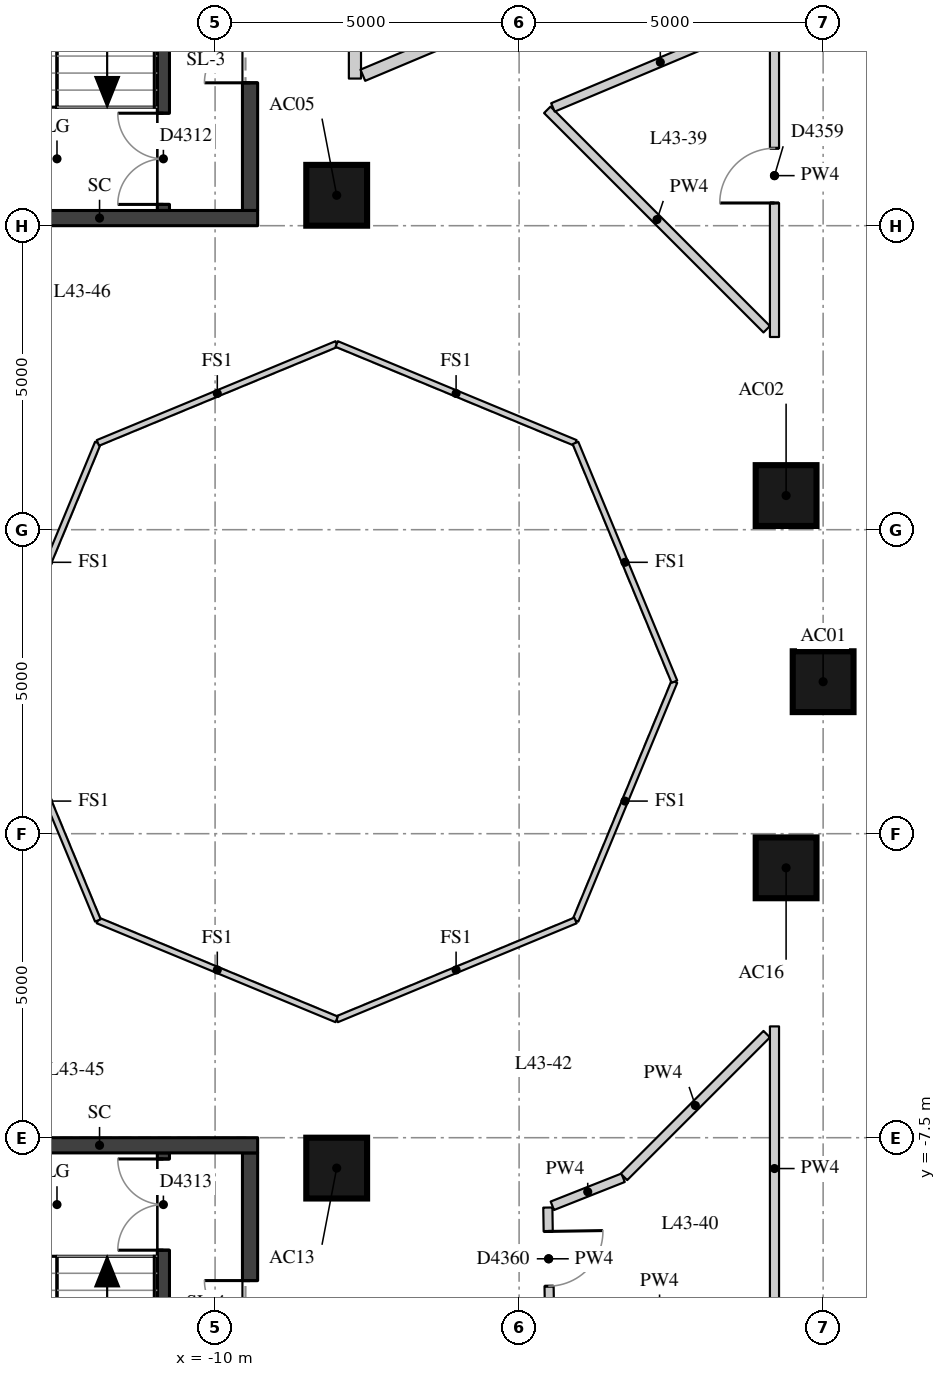
"""IFC4 building model, lengths in metres.
Left out: names, types, materials, properties, quantities, classifications, styles, units other than length and angle.
Written with IfcOpenShell. Run it as: python <this file> out.ifc"""

import sys

from ifc_helpers import new_model, si_unit, direction, frame, frame_2d, origin, origin_2d, place, context, subcontext, project, spatial, rectangle, extrude, element, fill, save


model = new_model("IFC4")
c1 = context("Model", 3, precision=1e-05, world=origin(), true_north=direction((0.0, 1.0)))
c2 = subcontext(c1, "Body", "Model", "MODEL_VIEW")
j1 = project(units=[si_unit("LENGTHUNIT", "METRE"), si_unit("PLANEANGLEUNIT", "RADIAN")], contexts=[c1])
p1 = place(None, origin())
s1 = spatial("IfcSite", under=j1, at=p1, CompositionType="ELEMENT")
p2 = place(p1, origin())
s2 = spatial("IfcBuilding", under=s1, at=p2, CompositionType="ELEMENT")
p3 = place(p2, frame((0.0, 0.0, 155.0)))
s3 = spatial("IfcBuildingStorey", under=s2, at=p3, CompositionType="ELEMENT", Elevation=155.0)
for number, where, z_axis, x_axis in (
    (1, (0.0, 0.0, 0.0), (0.0, 0.0, 1.0), (1.0, 0.0, 0.0)),
    (2, (-0.609, 3.062, 0.0), (0.0, 0.0, 1.0), (1.0, 0.0, 0.0)),
    (3, (-8.0, 8.0, 0.0), (0.0, 0.0, 1.0), (1.0, 0.0, 0.0)),
    (4, (-8.0, -8.0, 0.0), (0.0, 0.0, 1.0), (1.0, 0.0, 0.0)),
    (5, (-0.609, -3.062, 0.0), (0.0, 0.0, 1.0), (1.0, 0.0, 0.0)),
):
    element("IfcColumn", number, at=place(p3, frame(where, z_axis=z_axis, x_axis=x_axis)), inside=s3, PredefinedType="COLUMN", context=c2, shape_type="SweptSolid", body=[
        extrude(rectangle(XDim=1.0, YDim=1.0, at=origin_2d()), origin(), (0.0, 0.0, 1.0), 3.3),
    ])
p4 = place(p3, frame((-10.85, 7.75, 0.0), z_axis=(0.0, 0.0, 1.0), x_axis=(0.0, 1.0, 0.0)))
e6 = element("IfcWall", 6, at=p4, inside=s3, PredefinedType="SHEAR", context=c2, shape_type="SweptSolid", body=[
    extrude(rectangle(XDim=6.0, YDim=0.2, at=frame_2d((3.0, 0.0))), origin(), (0.0, 0.0, 1.0), 3.02),
])
p5 = place(p4, frame((0.1, 0.0, 0.0)))
e7 = element("IfcOpeningElement", 7, at=p5, cuts=e6, PredefinedType="OPENING", context=c2, shape_type="SweptSolid", body=[
    extrude(rectangle(XDim=1.5, YDim=2.1, at=frame_2d((0.75, 1.05))), frame((0.0, 0.11, 0.0), z_axis=(0.0, -1.0, 0.0), x_axis=(1.0, 0.0, 0.0)), (0.0, 0.0, 1.0), 0.22),
])
p6 = place(p3, frame((-10.85, -13.75, 0.0), z_axis=(0.0, 0.0, 1.0), x_axis=(0.0, 1.0, 0.0)))
e8 = element("IfcWall", 8, at=p6, inside=s3, PredefinedType="SHEAR", context=c2, shape_type="SweptSolid", body=[
    extrude(rectangle(XDim=6.0, YDim=0.2, at=frame_2d((3.0, 0.0))), origin(), (0.0, 0.0, 1.0), 3.02),
])
p7 = place(p6, frame((4.4, 0.0, 0.0)))
e9 = element("IfcOpeningElement", 9, at=p7, cuts=e8, PredefinedType="OPENING", context=c2, shape_type="SweptSolid", body=[
    extrude(rectangle(XDim=1.5, YDim=2.1, at=frame_2d((0.75, 1.05))), frame((0.0, 0.11, 0.0), z_axis=(0.0, -1.0, 0.0), x_axis=(1.0, 0.0, 0.0)), (0.0, 0.0, 1.0), 0.22),
])
p8 = place(p3, frame((-9.425, 7.75, -0.28), z_axis=(0.0, 0.0, 1.0), x_axis=(0.0, 1.0, 0.0)))
e10 = element("IfcWall", 10, at=p8, inside=s3, PredefinedType="SHEAR", context=c2, shape_type="SweptSolid", body=[
    extrude(rectangle(XDim=6.0, YDim=0.25, at=frame_2d((3.0, 0.0))), origin(), (0.0, 0.0, 1.0), 3.3),
])
p9 = place(p8, frame((2.1, 0.0, 0.28)))
e11 = element("IfcOpeningElement", 11, at=p9, cuts=e10, PredefinedType="OPENING", context=c2, shape_type="SweptSolid", body=[
    extrude(rectangle(XDim=1.5, YDim=2.1, at=frame_2d((0.75, 1.05))), frame((0.0, 0.135, 0.0), z_axis=(0.0, -1.0, 0.0), x_axis=(1.0, 0.0, 0.0)), (0.0, 0.0, 1.0), 0.27),
])
p10 = place(p3, frame((-14.5, 7.625, -0.28), z_axis=(0.0, 0.0, 1.0), x_axis=(1.0, 0.0, 0.0)))
e12 = element("IfcWall", 12, at=p10, inside=s3, PredefinedType="SHEAR", context=c2, shape_type="SweptSolid", body=[
    extrude(rectangle(XDim=5.2, YDim=0.25, at=frame_2d((2.6, 0.0))), origin(), (0.0, 0.0, 1.0), 3.3),
])
p11 = place(p3, frame((-9.425, -13.75, -0.28), z_axis=(0.0, 0.0, 1.0), x_axis=(0.0, 1.0, 0.0)))
e13 = element("IfcWall", 13, at=p11, inside=s3, PredefinedType="SHEAR", context=c2, shape_type="SweptSolid", body=[
    extrude(rectangle(XDim=6.0, YDim=0.25, at=frame_2d((3.0, 0.0))), origin(), (0.0, 0.0, 1.0), 3.3),
])
p12 = place(p11, frame((2.4, 0.0, 0.28)))
e14 = element("IfcOpeningElement", 14, at=p12, cuts=e13, PredefinedType="OPENING", context=c2, shape_type="SweptSolid", body=[
    extrude(rectangle(XDim=1.5, YDim=2.1, at=frame_2d((0.75, 1.05))), frame((0.0, 0.135, 0.0), z_axis=(0.0, -1.0, 0.0), x_axis=(1.0, 0.0, 0.0)), (0.0, 0.0, 1.0), 0.27),
])
p13 = place(p3, frame((-14.5, -7.625, -0.28), z_axis=(0.0, 0.0, 1.0), x_axis=(1.0, 0.0, 0.0)))
e15 = element("IfcWall", 15, at=p13, inside=s3, PredefinedType="SHEAR", context=c2, shape_type="SweptSolid", body=[
    extrude(rectangle(XDim=5.2, YDim=0.25, at=frame_2d((2.6, 0.0))), origin(), (0.0, 0.0, 1.0), 3.3),
])
p14 = place(p3, frame((-7.7, 15.295, 0.0), z_axis=(0.0, 0.0, 1.0), x_axis=(0.0, -1.0, 0.0)))
e16 = element("IfcWall", 16, at=p14, inside=s3, PredefinedType="PARTITIONING", context=c2, shape_type="SweptSolid", body=[
    extrude(rectangle(XDim=5.375, YDim=0.2, at=frame_2d((2.688, 0.0))), origin(), (0.0, 0.0, 1.0), 3.02),
])
p15 = place(p14, frame((0.57, 0.0, 0.0)))
e17 = element("IfcOpeningElement", 17, at=p15, cuts=e16, PredefinedType="OPENING", context=c2, shape_type="SweptSolid", body=[
    extrude(rectangle(XDim=1.1, YDim=2.1, at=frame_2d((0.55, 1.05))), frame((0.0, 0.11, 0.0), z_axis=(0.0, -1.0, 0.0), x_axis=(1.0, 0.0, 0.0)), (0.0, 0.0, 1.0), 0.22),
])
p16 = place(p3, frame((-7.57, 9.975, 0.0), z_axis=(0.0, 0.0, 1.0), x_axis=(0.921815879705, 0.387628022624, 0.0)))
e18 = element("IfcWall", 18, at=p16, inside=s3, PredefinedType="PARTITIONING", context=c2, shape_type="SweptSolid", body=[
    extrude(rectangle(XDim=8.321, YDim=0.2, at=frame_2d((4.16, 0.0))), origin(), (0.0, 0.0, 1.0), 3.02),
])
p17 = place(p16, frame((4.721, 0.0, 0.0)))
e19 = element("IfcOpeningElement", 19, at=p17, cuts=e18, PredefinedType="OPENING", context=c2, shape_type="SweptSolid", body=[
    extrude(rectangle(XDim=1.8, YDim=2.1, at=frame_2d((0.9, 1.05))), frame((0.0, 0.11, 0.0), z_axis=(0.0, -1.0, 0.0), x_axis=(1.0, 0.0, 0.0)), (0.0, 0.0, 1.0), 0.22),
])
p18 = place(p3, frame((-0.8, 10.977, 0.0), z_axis=(0.0, 0.0, 1.0), x_axis=(0.0, -1.0, 0.0)))
e20 = element("IfcWall", 20, at=p18, inside=s3, PredefinedType="PARTITIONING", context=c2, shape_type="SweptSolid", body=[
    extrude(rectangle(XDim=5.308, YDim=0.15, at=frame_2d((2.654, 0.0))), origin(), (0.0, 0.0, 1.0), 3.02),
])
p19 = place(p18, frame((2.204, 0.0, 0.0)))
e21 = element("IfcOpeningElement", 21, at=p19, cuts=e20, PredefinedType="OPENING", context=c2, shape_type="SweptSolid", body=[
    extrude(rectangle(XDim=0.9, YDim=2.1, at=frame_2d((0.45, 1.05))), frame((0.0, 0.085, 0.0), z_axis=(0.0, -1.0, 0.0), x_axis=(1.0, 0.0, 0.0)), (0.0, 0.0, 1.0), 0.17),
])
p20 = place(p3, frame((-0.927, 5.797, 0.0), z_axis=(0.0, 0.0, 1.0), x_axis=(-0.707106781187, 0.707106781187, 0.0)))
e22 = element("IfcWall", 22, at=p20, inside=s3, PredefinedType="PARTITIONING", context=c2, shape_type="SweptSolid", body=[
    extrude(rectangle(XDim=5.104, YDim=0.15, at=frame_2d((2.552, 0.0))), origin(), (0.0, 0.0, 1.0), 3.02),
])
p21 = place(p3, frame((-4.444, 9.445, 0.0), z_axis=(0.0, 0.0, 1.0), x_axis=(0.921822351054, 0.387612632788, 0.0)))
e23 = element("IfcWall", 23, at=p21, inside=s3, PredefinedType="PARTITIONING", context=c2, shape_type="SweptSolid", body=[
    extrude(rectangle(XDim=3.832, YDim=0.15, at=frame_2d((1.916, 0.0))), origin(), (0.0, 0.0, 1.0), 3.02),
])
p22 = place(p3, frame((-0.8, -5.669, 0.0), z_axis=(0.0, 0.0, 1.0), x_axis=(0.0, -1.0, 0.0)))
e24 = element("IfcWall", 24, at=p22, inside=s3, PredefinedType="PARTITIONING", context=c2, shape_type="SweptSolid", body=[
    extrude(rectangle(XDim=4.676, YDim=0.15, at=frame_2d((2.338, 0.0))), origin(), (0.0, 0.0, 1.0), 3.02),
])
p23 = place(p3, frame((-4.501, -10.334, 0.0), z_axis=(0.0, 0.0, 1.0), x_axis=(-0.015785981736, 0.999875393627, 0.0)))
e25 = element("IfcWall", 25, at=p23, inside=s3, PredefinedType="PARTITIONING", context=c2, shape_type="SweptSolid", body=[
    extrude(rectangle(XDim=1.686, YDim=0.15, at=frame_2d((0.843, 0.0))), origin(), (0.0, 0.0, 1.0), 3.02),
])
p24 = place(p23, frame((0.393, 0.0, 0.0)))
e26 = element("IfcOpeningElement", 26, at=p24, cuts=e25, PredefinedType="OPENING", context=c2, shape_type="SweptSolid", body=[
    extrude(rectangle(XDim=0.9, YDim=2.1, at=frame_2d((0.45, 1.05))), frame((0.0, 0.085, 0.0), z_axis=(0.0, -1.0, 0.0), x_axis=(1.0, 0.0, 0.0)), (0.0, 0.0, 1.0), 0.17),
])
p25 = place(p3, frame((-4.453, -8.62, 0.0), z_axis=(0.0, 0.0, 1.0), x_axis=(0.929802441214, 0.36805899026, 0.0)))
e27 = element("IfcWall", 27, at=p25, inside=s3, PredefinedType="PARTITIONING", context=c2, shape_type="SweptSolid", body=[
    extrude(rectangle(XDim=1.252, YDim=0.15, at=frame_2d((0.626, 0.0))), origin(), (0.0, 0.0, 1.0), 3.02),
])
p26 = place(p3, frame((-3.275, -8.145, 0.0), z_axis=(0.0, 0.0, 1.0), x_axis=(0.707106781187, 0.707106781187, 0.0)))
e28 = element("IfcWall", 28, at=p26, inside=s3, PredefinedType="PARTITIONING", context=c2, shape_type="SweptSolid", body=[
    extrude(rectangle(XDim=3.32, YDim=0.15, at=frame_2d((1.66, 0.0))), origin(), (0.0, 0.0, 1.0), 3.02),
])
for number, where, z_axis, x_axis in (
    (29, (-2.446, 0.0, 0.0), (0.0, 0.0, 1.0), (-0.383, -0.924, 0.0)),
    (30, (-4.073, -3.927, 0.0), (0.0, 0.0, 1.0), (-0.924, -0.383, 0.0)),
    (31, (-8.0, -5.554, 0.0), (0.0, 0.0, 1.0), (-0.924, 0.383, 0.0)),
    (32, (-11.927, -3.927, 0.0), (0.0, 0.0, 1.0), (-0.383, 0.924, 0.0)),
    (33, (-13.554, 0.0, 0.0), (0.0, 0.0, 1.0), (0.383, 0.924, 0.0)),
    (34, (-11.927, 3.927, 0.0), (0.0, 0.0, 1.0), (0.924, 0.383, 0.0)),
    (35, (-8.0, 5.554, 0.0), (0.0, 0.0, 1.0), (0.924, -0.383, 0.0)),
    (36, (-4.073, 3.927, 0.0), (0.0, 0.0, 1.0), (0.383, -0.924, 0.0)),
):
    element("IfcWall", number, at=place(p3, frame(where, z_axis=z_axis, x_axis=x_axis)), inside=s3, PredefinedType="PARTITIONING", context=c2, shape_type="SweptSolid", body=[
        extrude(rectangle(XDim=4.251, YDim=0.1, at=frame_2d((2.125, 0.0))), origin(), (0.0, 0.0, 1.0), 3.02),
    ])
p27 = place(p5, origin())
e37 = element("IfcDoor", 37, at=p27, inside=s3, OperationType="DOUBLE_DOOR_SINGLE_SWING", PredefinedType="DOOR", context=c2, shape_type="SweptSolid", body=[
    extrude(rectangle(XDim=1.5, YDim=2.1, at=frame_2d((0.75, 1.05))), frame((0.0, 0.025, 0.0), z_axis=(0.0, -1.0, 0.0), x_axis=(1.0, 0.0, 0.0)), (0.0, 0.0, 1.0), 0.05),
])
fill(e7, e37)
p28 = place(p7, origin())
e38 = element("IfcDoor", 38, at=p28, inside=s3, OperationType="DOUBLE_DOOR_SINGLE_SWING", PredefinedType="DOOR", context=c2, shape_type="SweptSolid", body=[
    extrude(rectangle(XDim=1.5, YDim=2.1, at=frame_2d((0.75, 1.05))), frame((0.0, 0.025, 0.0), z_axis=(0.0, -1.0, 0.0), x_axis=(1.0, 0.0, 0.0)), (0.0, 0.0, 1.0), 0.05),
])
fill(e9, e38)
p29 = place(p9, origin())
e39 = element("IfcDoor", 39, at=p29, inside=s3, OperationType="DOUBLE_DOOR_SINGLE_SWING", PredefinedType="DOOR", context=c2, shape_type="SweptSolid", body=[
    extrude(rectangle(XDim=1.5, YDim=2.1, at=frame_2d((0.75, 1.05))), frame((0.0, 0.025, 0.0), z_axis=(0.0, -1.0, 0.0), x_axis=(1.0, 0.0, 0.0)), (0.0, 0.0, 1.0), 0.05),
])
fill(e11, e39)
p30 = place(p12, origin())
e40 = element("IfcDoor", 40, at=p30, inside=s3, OperationType="DOUBLE_DOOR_SINGLE_SWING", PredefinedType="DOOR", context=c2, shape_type="SweptSolid", body=[
    extrude(rectangle(XDim=1.5, YDim=2.1, at=frame_2d((0.75, 1.05))), frame((0.0, 0.025, 0.0), z_axis=(0.0, -1.0, 0.0), x_axis=(1.0, 0.0, 0.0)), (0.0, 0.0, 1.0), 0.05),
])
fill(e14, e40)
p31 = place(p19, origin())
e41 = element("IfcDoor", 41, at=p31, inside=s3, OperationType="SINGLE_SWING_LEFT", PredefinedType="DOOR", context=c2, shape_type="SweptSolid", body=[
    extrude(rectangle(XDim=0.9, YDim=2.1, at=frame_2d((0.45, 1.05))), frame((0.0, 0.025, 0.0), z_axis=(0.0, -1.0, 0.0), x_axis=(1.0, 0.0, 0.0)), (0.0, 0.0, 1.0), 0.05),
])
fill(e21, e41)
p32 = place(p24, origin())
e42 = element("IfcDoor", 42, at=p32, inside=s3, OperationType="SINGLE_SWING_LEFT", PredefinedType="DOOR", context=c2, shape_type="SweptSolid", body=[
    extrude(rectangle(XDim=0.9, YDim=2.1, at=frame_2d((0.45, 1.05))), frame((0.0, 0.025, 0.0), z_axis=(0.0, -1.0, 0.0), x_axis=(1.0, 0.0, 0.0)), (0.0, 0.0, 1.0), 0.05),
])
fill(e26, e42)
save(model, sys.argv[1])
